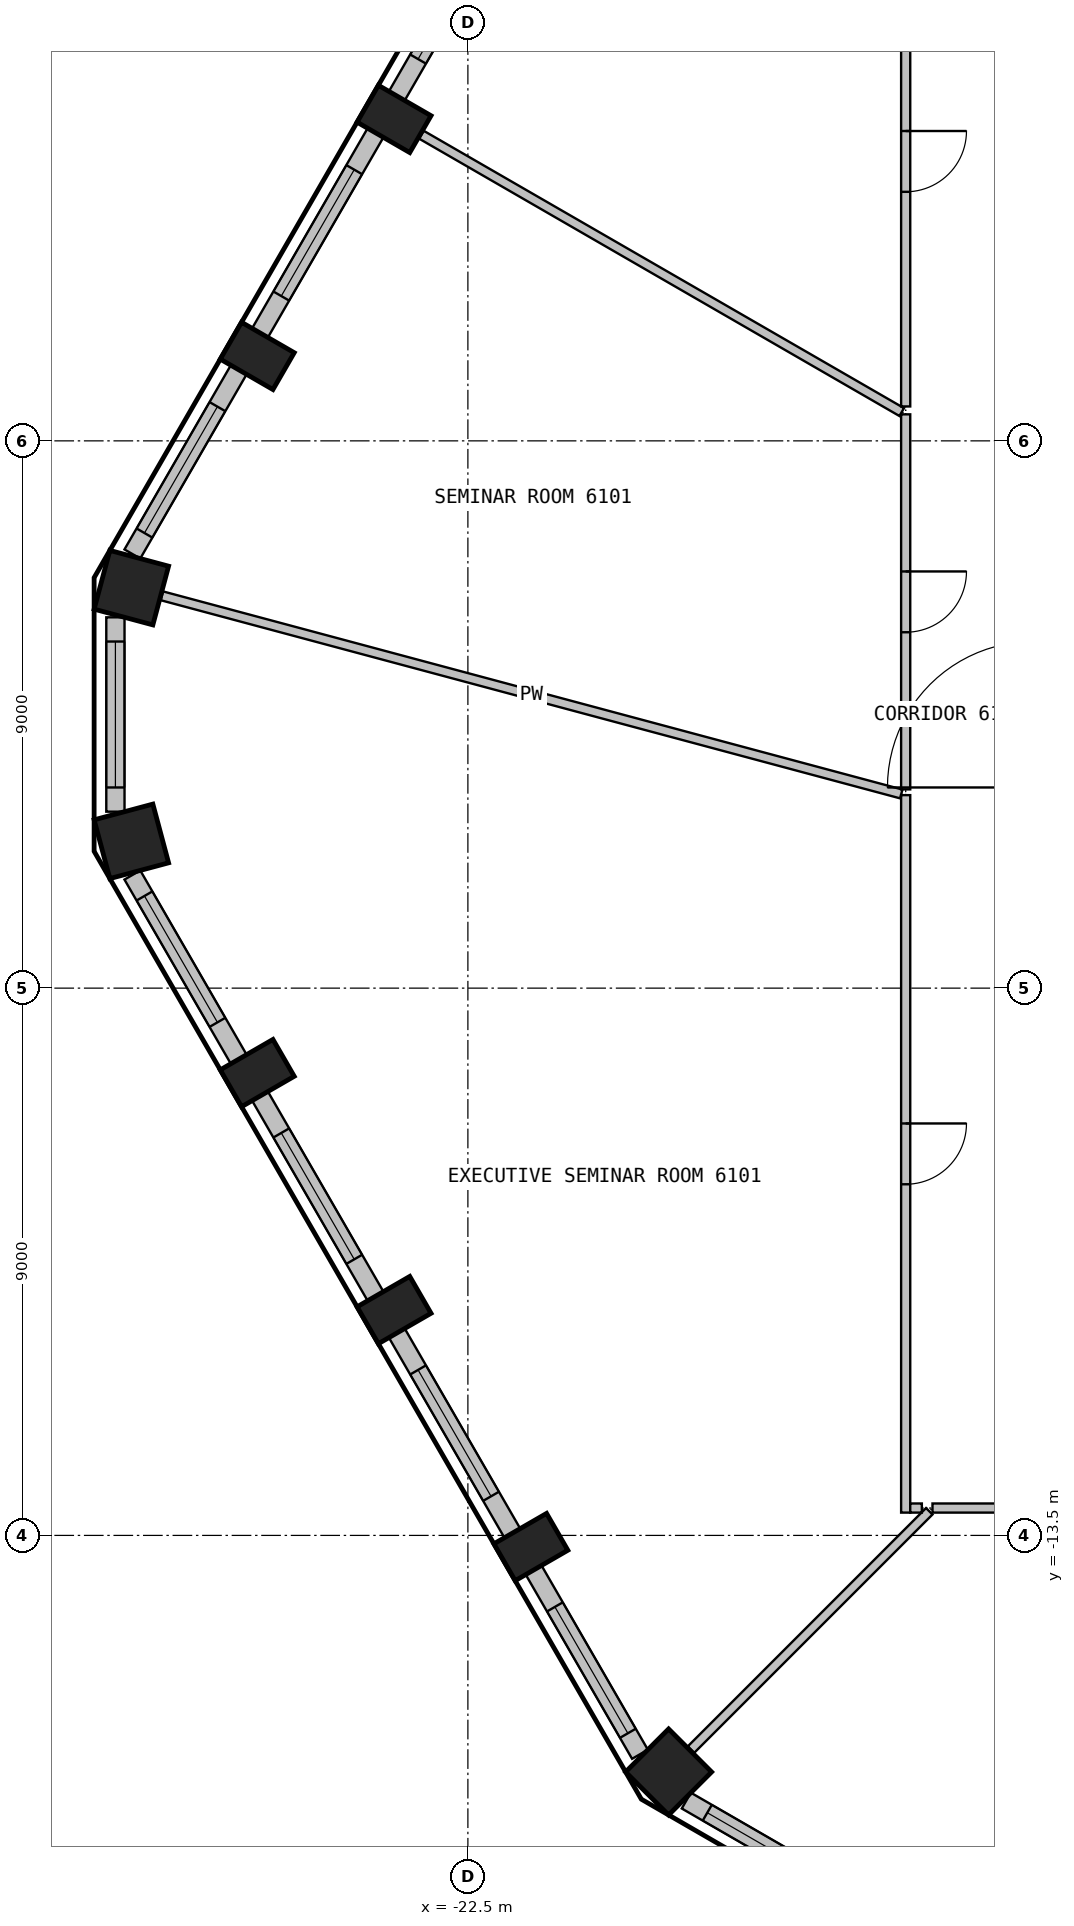
"""IFC4 building model, lengths in metres.
Left out: names, types, materials, properties, quantities, classifications, styles, units other than length and angle.
Written with IfcOpenShell. Run it as: python <this file> out.ifc"""

import sys

from ifc_helpers import new_model, si_unit, direction, frame, frame_2d, origin, origin_2d, place, context, subcontext, project, spatial, rectangle, extrude, element, fill, save


model = new_model("IFC4")
c1 = context("Model", 3, precision=1e-05, world=origin(), true_north=direction((0.0, 1.0)))
c2 = subcontext(c1, "Body", "Model", "MODEL_VIEW")
j1 = project(units=[si_unit("LENGTHUNIT", "METRE"), si_unit("PLANEANGLEUNIT", "RADIAN")], contexts=[c1])
p1 = place(None, origin())
s1 = spatial("IfcSite", under=j1, at=p1, CompositionType="ELEMENT")
p2 = place(p1, origin())
s2 = spatial("IfcBuilding", under=s1, at=p2, CompositionType="ELEMENT")
p3 = place(p2, frame((0.0, 0.0, 246.9)))
s3 = spatial("IfcBuildingStorey", under=s2, at=p3, CompositionType="ELEMENT", Elevation=246.9)
for number, where, z_axis, x_axis in (
    (1, (-23.714, 9.794, 0.0), (0.0, 0.0, 1.0), (-0.5, -0.866, 0.0)),
    (2, (-25.964, 5.897, 0.0), (0.0, 0.0, 1.0), (-0.5, -0.866, 0.0)),
):
    element("IfcColumn", number, at=place(p3, frame(where, z_axis=z_axis, x_axis=x_axis)), inside=s3, PredefinedType="COLUMN", context=c2, shape_type="SweptSolid", body=[
        extrude(rectangle(XDim=0.7, YDim=1.0, at=origin_2d()), origin(), (0.0, 0.0, 1.0), 3.575),
    ])
for number, where, z_axis, x_axis in (
    (3, (-28.035, 2.086, 0.0), (0.0, 0.0, 1.0), (-0.259, -0.966, 0.0)),
    (4, (-28.035, -2.086, 0.0), (0.0, 0.0, 1.0), (0.259, -0.966, 0.0)),
):
    element("IfcColumn", number, at=place(p3, frame(where, z_axis=z_axis, x_axis=x_axis)), inside=s3, PredefinedType="COLUMN", context=c2, shape_type="SweptSolid", body=[
        extrude(rectangle(XDim=1.0, YDim=1.0, at=origin_2d()), origin(), (0.0, 0.0, 1.0), 3.575),
    ])
for number, where, z_axis, x_axis in (
    (5, (-25.964, -5.897, 0.0), (0.0, 0.0, 1.0), (0.5, -0.866, 0.0)),
    (6, (-23.714, -9.794, 0.0), (0.0, 0.0, 1.0), (0.5, -0.866, 0.0)),
    (7, (-21.464, -13.691, 0.0), (0.0, 0.0, 1.0), (0.5, -0.866, 0.0)),
):
    element("IfcColumn", number, at=place(p3, frame(where, z_axis=z_axis, x_axis=x_axis)), inside=s3, PredefinedType="COLUMN", context=c2, shape_type="SweptSolid", body=[
        extrude(rectangle(XDim=0.7, YDim=1.0, at=origin_2d()), origin(), (0.0, 0.0, 1.0), 3.575),
    ])
p4 = place(p3, frame((-19.199, -17.39, 0.0), z_axis=(0.0, 0.0, 1.0), x_axis=(0.707106781187, -0.707106781187, 0.0)))
e8 = element("IfcColumn", 8, at=p4, inside=s3, PredefinedType="COLUMN", context=c2, shape_type="SweptSolid", body=[
    extrude(rectangle(XDim=1.0, YDim=1.0, at=origin_2d()), origin(), (0.0, 0.0, 1.0), 3.575),
])
p5 = place(p3, frame((-21.769, 13.463, 0.0), z_axis=(0.0, 0.0, 1.0), x_axis=(-0.499982058975, -0.866035761792, 0.0)))
e9 = element("IfcWall", 9, at=p5, inside=s3, PredefinedType="SOLIDWALL", context=c2, shape_type="SweptSolid", body=[
    extrude(rectangle(XDim=3.799, YDim=0.3, at=frame_2d((1.899, 0.0))), origin(), (0.0, 0.0, 1.0), 3.575),
])
p6 = place(p5, frame((0.699, 0.0, 0.9)))
e10 = element("IfcOpeningElement", 10, at=p6, cuts=e9, PredefinedType="OPENING", context=c2, shape_type="SweptSolid", body=[
    extrude(rectangle(XDim=2.4, YDim=2.1, at=frame_2d((1.2, 1.05))), frame((0.0, 0.16, 0.0), z_axis=(0.0, -1.0, 0.0), x_axis=(1.0, 0.0, 0.0)), (0.0, 0.0, 1.0), 0.32),
])
p7 = place(p3, frame((-24.019, 9.566, 0.0), z_axis=(0.0, 0.0, 1.0), x_axis=(-0.499982058975, -0.866035761792, 0.0)))
e11 = element("IfcWall", 11, at=p7, inside=s3, PredefinedType="SOLIDWALL", context=c2, shape_type="SweptSolid", body=[
    extrude(rectangle(XDim=3.799, YDim=0.3, at=frame_2d((1.899, 0.0))), origin(), (0.0, 0.0, 1.0), 3.575),
])
p8 = place(p7, frame((0.699, 0.0, 0.9)))
e12 = element("IfcOpeningElement", 12, at=p8, cuts=e11, PredefinedType="OPENING", context=c2, shape_type="SweptSolid", body=[
    extrude(rectangle(XDim=2.4, YDim=2.1, at=frame_2d((1.2, 1.05))), frame((0.0, 0.16, 0.0), z_axis=(0.0, -1.0, 0.0), x_axis=(1.0, 0.0, 0.0)), (0.0, 0.0, 1.0), 0.32),
])
p9 = place(p3, frame((-26.269, 5.669, 0.0), z_axis=(0.0, 0.0, 1.0), x_axis=(-0.499990325971, -0.866030989016, 0.0)))
e13 = element("IfcWall", 13, at=p9, inside=s3, PredefinedType="SOLIDWALL", context=c2, shape_type="SweptSolid", body=[
    extrude(rectangle(XDim=3.498, YDim=0.3, at=frame_2d((1.749, 0.0))), origin(), (0.0, 0.0, 1.0), 3.575),
])
p10 = place(p9, frame((0.699, 0.0, 0.9)))
e14 = element("IfcOpeningElement", 14, at=p10, cuts=e13, PredefinedType="OPENING", context=c2, shape_type="SweptSolid", body=[
    extrude(rectangle(XDim=2.4, YDim=2.1, at=frame_2d((1.2, 1.05))), frame((0.0, 0.16, 0.0), z_axis=(0.0, -1.0, 0.0), x_axis=(1.0, 0.0, 0.0)), (0.0, 0.0, 1.0), 0.32),
])
p11 = place(p3, frame((-28.297, 1.598, 0.0), z_axis=(0.0, 0.0, 1.0), x_axis=(0.0, -1.0, 0.0)))
e15 = element("IfcWall", 15, at=p11, inside=s3, PredefinedType="SOLIDWALL", context=c2, shape_type="SweptSolid", body=[
    extrude(rectangle(XDim=3.196, YDim=0.3, at=frame_2d((1.598, 0.0))), origin(), (0.0, 0.0, 1.0), 3.575),
])
p12 = place(p11, frame((0.398, 0.0, 0.9)))
e16 = element("IfcOpeningElement", 16, at=p12, cuts=e15, PredefinedType="OPENING", context=c2, shape_type="SweptSolid", body=[
    extrude(rectangle(XDim=2.4, YDim=2.1, at=frame_2d((1.2, 1.05))), frame((0.0, 0.16, 0.0), z_axis=(0.0, -1.0, 0.0), x_axis=(1.0, 0.0, 0.0)), (0.0, 0.0, 1.0), 0.32),
])
p13 = place(p3, frame((-28.018, -2.64, 0.0), z_axis=(0.0, 0.0, 1.0), x_axis=(0.499990325971, -0.866030989016, 0.0)))
e17 = element("IfcWall", 17, at=p13, inside=s3, PredefinedType="SOLIDWALL", context=c2, shape_type="SweptSolid", body=[
    extrude(rectangle(XDim=3.498, YDim=0.3, at=frame_2d((1.749, 0.0))), origin(), (0.0, 0.0, 1.0), 3.575),
])
p14 = place(p13, frame((0.398, 0.0, 0.9)))
e18 = element("IfcOpeningElement", 18, at=p14, cuts=e17, PredefinedType="OPENING", context=c2, shape_type="SweptSolid", body=[
    extrude(rectangle(XDim=2.4, YDim=2.1, at=frame_2d((1.2, 1.05))), frame((0.0, 0.16, 0.0), z_axis=(0.0, -1.0, 0.0), x_axis=(1.0, 0.0, 0.0)), (0.0, 0.0, 1.0), 0.32),
])
p15 = place(p3, frame((-25.919, -6.276, 0.0), z_axis=(0.0, 0.0, 1.0), x_axis=(0.499982058975, -0.866035761792, 0.0)))
e19 = element("IfcWall", 19, at=p15, inside=s3, PredefinedType="SOLIDWALL", context=c2, shape_type="SweptSolid", body=[
    extrude(rectangle(XDim=3.799, YDim=0.3, at=frame_2d((1.899, 0.0))), origin(), (0.0, 0.0, 1.0), 3.575),
])
p16 = place(p15, frame((0.699, 0.0, 0.9)))
e20 = element("IfcOpeningElement", 20, at=p16, cuts=e19, PredefinedType="OPENING", context=c2, shape_type="SweptSolid", body=[
    extrude(rectangle(XDim=2.4, YDim=2.1, at=frame_2d((1.2, 1.05))), frame((0.0, 0.16, 0.0), z_axis=(0.0, -1.0, 0.0), x_axis=(1.0, 0.0, 0.0)), (0.0, 0.0, 1.0), 0.32),
])
p17 = place(p3, frame((-23.669, -10.173, 0.0), z_axis=(0.0, 0.0, 1.0), x_axis=(0.499982058975, -0.866035761792, 0.0)))
e21 = element("IfcWall", 21, at=p17, inside=s3, PredefinedType="SOLIDWALL", context=c2, shape_type="SweptSolid", body=[
    extrude(rectangle(XDim=3.799, YDim=0.3, at=frame_2d((1.899, 0.0))), origin(), (0.0, 0.0, 1.0), 3.575),
])
p18 = place(p17, frame((0.699, 0.0, 0.9)))
e22 = element("IfcOpeningElement", 22, at=p18, cuts=e21, PredefinedType="OPENING", context=c2, shape_type="SweptSolid", body=[
    extrude(rectangle(XDim=2.4, YDim=2.1, at=frame_2d((1.2, 1.05))), frame((0.0, 0.16, 0.0), z_axis=(0.0, -1.0, 0.0), x_axis=(1.0, 0.0, 0.0)), (0.0, 0.0, 1.0), 0.32),
])
p19 = place(p3, frame((-21.419, -14.07, 0.0), z_axis=(0.0, 0.0, 1.0), x_axis=(0.499960102815, -0.866048437209, 0.0)))
e23 = element("IfcWall", 23, at=p19, inside=s3, PredefinedType="SOLIDWALL", context=c2, shape_type="SweptSolid", body=[
    extrude(rectangle(XDim=3.498, YDim=0.3, at=frame_2d((1.749, 0.0))), origin(), (0.0, 0.0, 1.0), 3.575),
])
p20 = place(p19, frame((0.699, 0.0, 0.9)))
e24 = element("IfcOpeningElement", 24, at=p20, cuts=e23, PredefinedType="OPENING", context=c2, shape_type="SweptSolid", body=[
    extrude(rectangle(XDim=2.4, YDim=2.1, at=frame_2d((1.2, 1.05))), frame((0.0, 0.16, 0.0), z_axis=(0.0, -1.0, 0.0), x_axis=(1.0, 0.0, 0.0)), (0.0, 0.0, 1.0), 0.32),
])
p21 = place(p3, frame((-18.908, -17.861, 0.0), z_axis=(0.0, 0.0, 1.0), x_axis=(0.866025316205, -0.500000151692, 0.0)))
e25 = element("IfcWall", 25, at=p21, inside=s3, PredefinedType="SOLIDWALL", context=c2, shape_type="SweptSolid", body=[
    extrude(rectangle(XDim=3.196, YDim=0.3, at=frame_2d((1.598, 0.0))), origin(), (0.0, 0.0, 1.0), 3.575),
])
p22 = place(p21, frame((0.398, 0.0, 0.9)))
e26 = element("IfcOpeningElement", 26, at=p22, cuts=e25, PredefinedType="OPENING", context=c2, shape_type="SweptSolid", body=[
    extrude(rectangle(XDim=2.4, YDim=2.1, at=frame_2d((1.2, 1.05))), frame((0.0, 0.16, 0.0), z_axis=(0.0, -1.0, 0.0), x_axis=(1.0, 0.0, 0.0)), (0.0, 0.0, 1.0), 0.32),
])
p23 = place(p3, frame((-15.372, -1.307, 0.0), z_axis=(0.0, 0.0, 1.0), x_axis=(-0.965924592024, 0.258823651398, 0.0)))
e27 = element("IfcWall", 27, at=p23, inside=s3, PredefinedType="PARTITIONING", context=c2, shape_type="SweptSolid", body=[
    extrude(rectangle(XDim=12.589, YDim=0.15, at=frame_2d((6.294, 0.0))), origin(), (0.0, 0.0, 1.0), 3.575),
])
p24 = place(p3, frame((-23.264, 9.534, 0.0), z_axis=(0.0, 0.0, 1.0), x_axis=(0.866009068046, -0.500028293261, 0.0)))
e28 = element("IfcWall", 28, at=p24, inside=s3, PredefinedType="PARTITIONING", context=c2, shape_type="SweptSolid", body=[
    extrude(rectangle(XDim=9.121, YDim=0.15, at=frame_2d((4.561, 0.0))), origin(), (0.0, 0.0, 1.0), 3.575),
])
p25 = place(p3, frame((-14.912, -13.103, 0.0), z_axis=(0.0, 0.0, 1.0), x_axis=(-0.707018679171, -0.707194872226, 0.0)))
e29 = element("IfcWall", 29, at=p25, inside=s3, PredefinedType="PARTITIONING", context=c2, shape_type="SweptSolid", body=[
    extrude(rectangle(XDim=5.542, YDim=0.15, at=frame_2d((2.771, 0.0))), origin(), (0.0, 0.0, 1.0), 3.575),
])
p26 = place(p3, frame((-15.3, -1.326, 0.0), z_axis=(0.0, 0.0, 1.0), x_axis=(0.0, -1.0, 0.0)))
e30 = element("IfcWall", 30, at=p26, inside=s3, PredefinedType="PARTITIONING", context=c2, shape_type="SweptSolid", body=[
    extrude(rectangle(XDim=11.799, YDim=0.15, at=frame_2d((5.899, 0.0))), origin(), (0.0, 0.0, 1.0), 3.575),
])
p27 = place(p26, frame((5.399, 0.0, 0.0)))
e31 = element("IfcOpeningElement", 31, at=p27, cuts=e30, PredefinedType="OPENING", context=c2, shape_type="SweptSolid", body=[
    extrude(rectangle(XDim=1.0, YDim=2.1, at=frame_2d((0.5, 1.05))), frame((0.0, 0.085, 0.0), z_axis=(0.0, -1.0, 0.0), x_axis=(1.0, 0.0, 0.0)), (0.0, 0.0, 1.0), 0.17),
])
p28 = place(p3, frame((-15.225, -13.05, 0.0), z_axis=(0.0, 0.0, 1.0), x_axis=(1.0, 0.0, 0.0)))
e32 = element("IfcWall", 32, at=p28, inside=s3, PredefinedType="PARTITIONING", context=c2, shape_type="SweptSolid", body=[
    extrude(rectangle(XDim=0.191, YDim=0.15, at=frame_2d((0.096, 0.0))), origin(), (0.0, 0.0, 1.0), 3.575),
])
p29 = place(p3, frame((-15.3, 4.936, 0.0), z_axis=(0.0, 0.0, 1.0), x_axis=(0.0, -1.0, 0.0)))
e33 = element("IfcWall", 33, at=p29, inside=s3, PredefinedType="PARTITIONING", context=c2, shape_type="SweptSolid", body=[
    extrude(rectangle(XDim=6.167, YDim=0.15, at=frame_2d((3.083, 0.0))), origin(), (0.0, 0.0, 1.0), 3.575),
])
p30 = place(p29, frame((2.583, 0.0, 0.0)))
e34 = element("IfcOpeningElement", 34, at=p30, cuts=e33, PredefinedType="OPENING", context=c2, shape_type="SweptSolid", body=[
    extrude(rectangle(XDim=1.0, YDim=2.1, at=frame_2d((0.5, 1.05))), frame((0.0, 0.085, 0.0), z_axis=(0.0, -1.0, 0.0), x_axis=(1.0, 0.0, 0.0)), (0.0, 0.0, 1.0), 0.17),
])
p31 = place(p3, frame((-15.3, 13.125, 0.0), z_axis=(0.0, 0.0, 1.0), x_axis=(0.0, -1.0, 0.0)))
e35 = element("IfcWall", 35, at=p31, inside=s3, PredefinedType="PARTITIONING", context=c2, shape_type="SweptSolid", body=[
    extrude(rectangle(XDim=8.059, YDim=0.15, at=frame_2d((4.03, 0.0))), origin(), (0.0, 0.0, 1.0), 3.575),
])
p32 = place(p31, frame((3.53, 0.0, 0.0)))
e36 = element("IfcOpeningElement", 36, at=p32, cuts=e35, PredefinedType="OPENING", context=c2, shape_type="SweptSolid", body=[
    extrude(rectangle(XDim=1.0, YDim=2.1, at=frame_2d((0.5, 1.05))), frame((0.0, 0.085, 0.0), z_axis=(0.0, -1.0, 0.0), x_axis=(1.0, 0.0, 0.0)), (0.0, 0.0, 1.0), 0.17),
])
p33 = place(p3, frame((-14.859, -13.05, 0.0), z_axis=(0.0, 0.0, 1.0), x_axis=(1.0, 0.0, 0.0)))
e37 = element("IfcWall", 37, at=p33, inside=s3, PredefinedType="PARTITIONING", context=c2, shape_type="SweptSolid", body=[
    extrude(rectangle(XDim=12.609, YDim=0.15, at=frame_2d((6.304, 0.0))), origin(), (0.0, 0.0, 1.0), 3.575),
])
p34 = place(p33, frame((5.804, 0.0, 0.0)))
e38 = element("IfcOpeningElement", 38, at=p34, cuts=e37, PredefinedType="OPENING", context=c2, shape_type="SweptSolid", body=[
    extrude(rectangle(XDim=1.0, YDim=2.1, at=frame_2d((0.5, 1.05))), frame((0.0, 0.085, 0.0), z_axis=(0.0, -1.0, 0.0), x_axis=(1.0, 0.0, 0.0)), (0.0, 0.0, 1.0), 0.17),
])
p35 = place(p6, origin())
e39 = element("IfcWindow", 39, at=p35, inside=s3, PartitioningType="SINGLE_PANEL", PredefinedType="WINDOW", context=c2, shape_type="SweptSolid", body=[
    extrude(rectangle(XDim=2.4, YDim=2.1, at=frame_2d((1.2, 1.05))), frame((0.0, 0.03, 0.0), z_axis=(0.0, -1.0, 0.0), x_axis=(1.0, 0.0, 0.0)), (0.0, 0.0, 1.0), 0.06),
])
fill(e10, e39)
p36 = place(p8, origin())
e40 = element("IfcWindow", 40, at=p36, inside=s3, PartitioningType="SINGLE_PANEL", PredefinedType="WINDOW", context=c2, shape_type="SweptSolid", body=[
    extrude(rectangle(XDim=2.4, YDim=2.1, at=frame_2d((1.2, 1.05))), frame((0.0, 0.03, 0.0), z_axis=(0.0, -1.0, 0.0), x_axis=(1.0, 0.0, 0.0)), (0.0, 0.0, 1.0), 0.06),
])
fill(e12, e40)
p37 = place(p10, origin())
e41 = element("IfcWindow", 41, at=p37, inside=s3, PartitioningType="SINGLE_PANEL", PredefinedType="WINDOW", context=c2, shape_type="SweptSolid", body=[
    extrude(rectangle(XDim=2.4, YDim=2.1, at=frame_2d((1.2, 1.05))), frame((0.0, 0.03, 0.0), z_axis=(0.0, -1.0, 0.0), x_axis=(1.0, 0.0, 0.0)), (0.0, 0.0, 1.0), 0.06),
])
fill(e14, e41)
p38 = place(p12, origin())
e42 = element("IfcWindow", 42, at=p38, inside=s3, PartitioningType="SINGLE_PANEL", PredefinedType="WINDOW", context=c2, shape_type="SweptSolid", body=[
    extrude(rectangle(XDim=2.4, YDim=2.1, at=frame_2d((1.2, 1.05))), frame((0.0, 0.03, 0.0), z_axis=(0.0, -1.0, 0.0), x_axis=(1.0, 0.0, 0.0)), (0.0, 0.0, 1.0), 0.06),
])
fill(e16, e42)
p39 = place(p14, origin())
e43 = element("IfcWindow", 43, at=p39, inside=s3, PartitioningType="SINGLE_PANEL", PredefinedType="WINDOW", context=c2, shape_type="SweptSolid", body=[
    extrude(rectangle(XDim=2.4, YDim=2.1, at=frame_2d((1.2, 1.05))), frame((0.0, 0.03, 0.0), z_axis=(0.0, -1.0, 0.0), x_axis=(1.0, 0.0, 0.0)), (0.0, 0.0, 1.0), 0.06),
])
fill(e18, e43)
p40 = place(p16, origin())
e44 = element("IfcWindow", 44, at=p40, inside=s3, PartitioningType="SINGLE_PANEL", PredefinedType="WINDOW", context=c2, shape_type="SweptSolid", body=[
    extrude(rectangle(XDim=2.4, YDim=2.1, at=frame_2d((1.2, 1.05))), frame((0.0, 0.03, 0.0), z_axis=(0.0, -1.0, 0.0), x_axis=(1.0, 0.0, 0.0)), (0.0, 0.0, 1.0), 0.06),
])
fill(e20, e44)
p41 = place(p18, origin())
e45 = element("IfcWindow", 45, at=p41, inside=s3, PartitioningType="SINGLE_PANEL", PredefinedType="WINDOW", context=c2, shape_type="SweptSolid", body=[
    extrude(rectangle(XDim=2.4, YDim=2.1, at=frame_2d((1.2, 1.05))), frame((0.0, 0.03, 0.0), z_axis=(0.0, -1.0, 0.0), x_axis=(1.0, 0.0, 0.0)), (0.0, 0.0, 1.0), 0.06),
])
fill(e22, e45)
p42 = place(p20, origin())
e46 = element("IfcWindow", 46, at=p42, inside=s3, PartitioningType="SINGLE_PANEL", PredefinedType="WINDOW", context=c2, shape_type="SweptSolid", body=[
    extrude(rectangle(XDim=2.4, YDim=2.1, at=frame_2d((1.2, 1.05))), frame((0.0, 0.03, 0.0), z_axis=(0.0, -1.0, 0.0), x_axis=(1.0, 0.0, 0.0)), (0.0, 0.0, 1.0), 0.06),
])
fill(e24, e46)
p43 = place(p22, origin())
e47 = element("IfcWindow", 47, at=p43, inside=s3, PartitioningType="SINGLE_PANEL", PredefinedType="WINDOW", context=c2, shape_type="SweptSolid", body=[
    extrude(rectangle(XDim=2.4, YDim=2.1, at=frame_2d((1.2, 1.05))), frame((0.0, 0.03, 0.0), z_axis=(0.0, -1.0, 0.0), x_axis=(1.0, 0.0, 0.0)), (0.0, 0.0, 1.0), 0.06),
])
fill(e26, e47)
p44 = place(p30, origin())
e48 = element("IfcDoor", 48, at=p44, inside=s3, OperationType="SINGLE_SWING_LEFT", PredefinedType="DOOR", context=c2, shape_type="SweptSolid", body=[
    extrude(rectangle(XDim=1.0, YDim=2.1, at=frame_2d((0.5, 1.05))), frame((0.0, 0.025, 0.0), z_axis=(0.0, -1.0, 0.0), x_axis=(1.0, 0.0, 0.0)), (0.0, 0.0, 1.0), 0.05),
])
fill(e34, e48)
p45 = place(p27, origin())
e49 = element("IfcDoor", 49, at=p45, inside=s3, OperationType="SINGLE_SWING_RIGHT", PredefinedType="DOOR", context=c2, shape_type="SweptSolid", body=[
    extrude(rectangle(XDim=1.0, YDim=2.1, at=frame_2d((0.5, 1.05))), frame((0.0, 0.025, 0.0), z_axis=(0.0, -1.0, 0.0), x_axis=(1.0, 0.0, 0.0)), (0.0, 0.0, 1.0), 0.05),
])
fill(e31, e49)
p46 = place(p32, origin())
e50 = element("IfcDoor", 50, at=p46, inside=s3, OperationType="SINGLE_SWING_LEFT", PredefinedType="DOOR", context=c2, shape_type="SweptSolid", body=[
    extrude(rectangle(XDim=1.0, YDim=2.1, at=frame_2d((0.5, 1.05))), frame((0.0, 0.025, 0.0), z_axis=(0.0, -1.0, 0.0), x_axis=(1.0, 0.0, 0.0)), (0.0, 0.0, 1.0), 0.05),
])
fill(e36, e50)
save(model, sys.argv[1])
